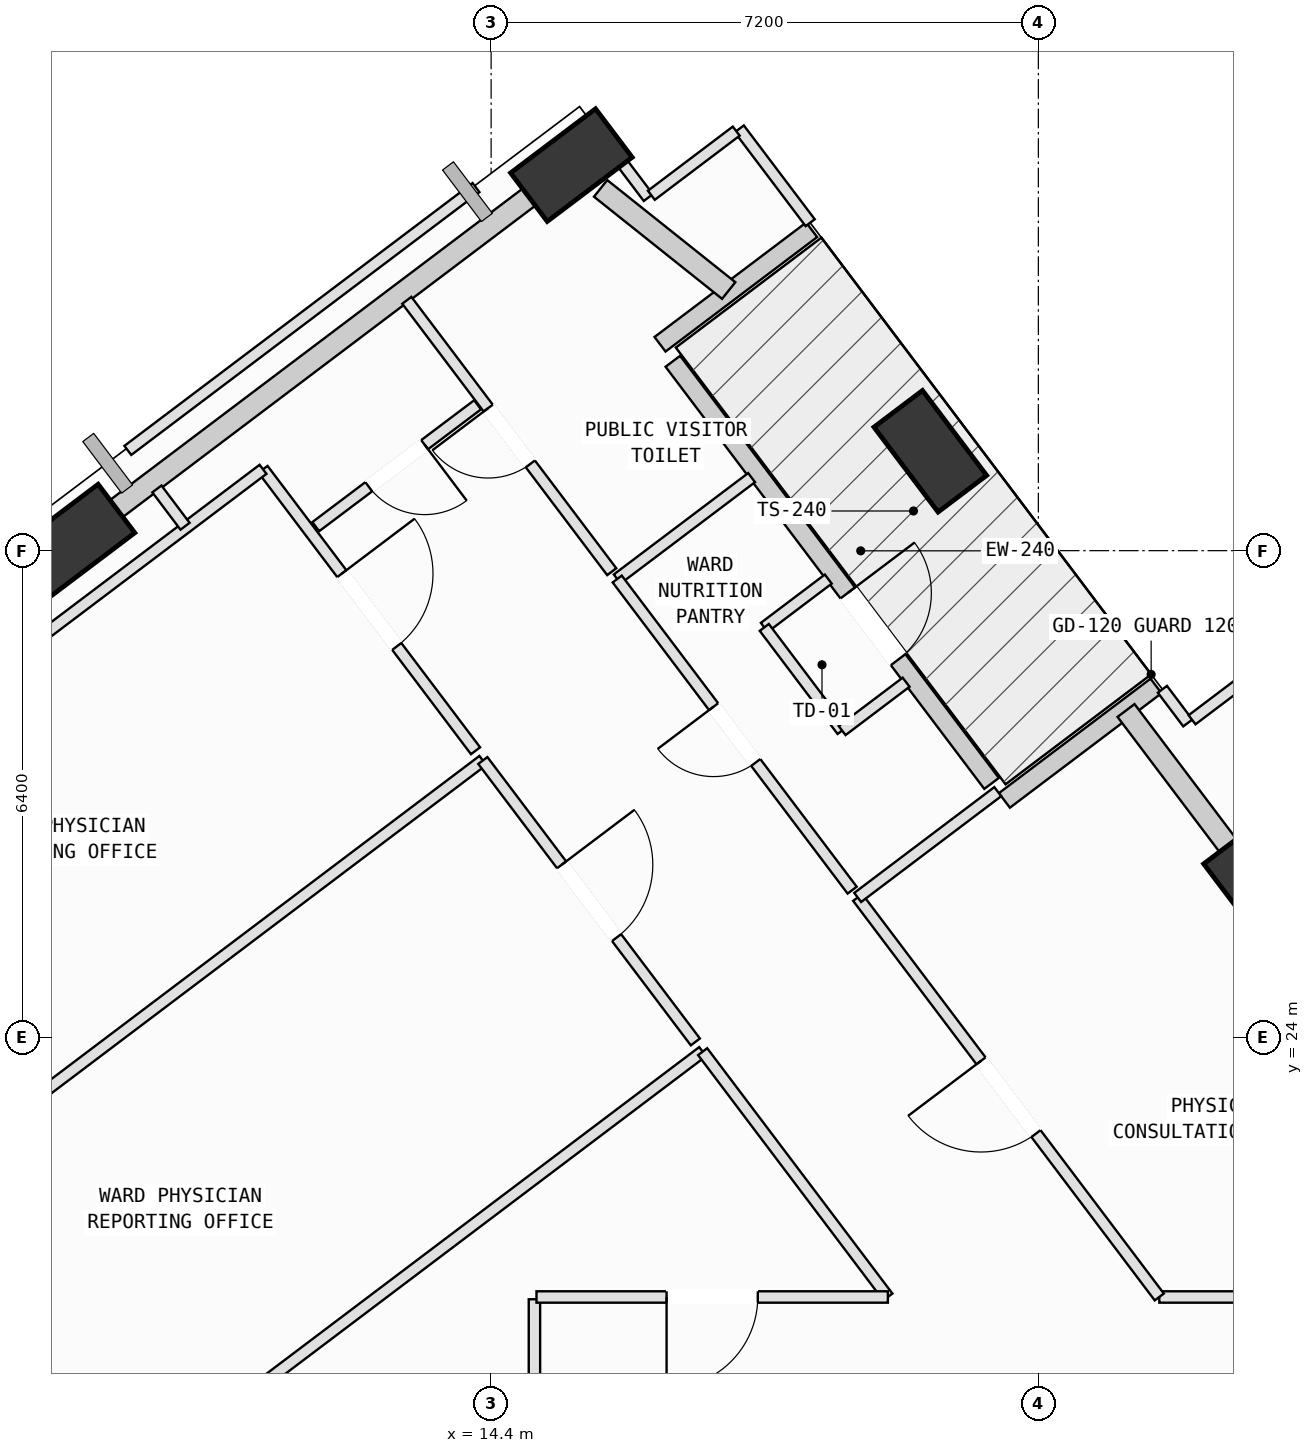
"""IFC4 building model, lengths in metres.
Left out: names, types, materials, properties, quantities, classifications, styles, units other than length and angle.
Written with IfcOpenShell. Run it as: python <this file> out.ifc"""

import sys

from ifc_helpers import new_model, si_unit, direction, frame, frame_2d, origin, origin_2d, place, context, subcontext, project, spatial, rectangle, extrude, element, fill, save


model = new_model("IFC4")
c1 = context("Model", 3, precision=1e-05, world=origin(), true_north=direction((0.0, 1.0)))
c2 = subcontext(c1, "Body", "Model", "MODEL_VIEW")
j1 = project(units=[si_unit("LENGTHUNIT", "METRE"), si_unit("PLANEANGLEUNIT", "RADIAN")], contexts=[c1])
p1 = place(None, origin())
s1 = spatial("IfcSite", under=j1, at=p1, CompositionType="ELEMENT")
p2 = place(p1, origin())
s2 = spatial("IfcBuilding", under=s1, at=p2, CompositionType="ELEMENT")
p3 = place(p2, frame((0.0, 0.0, 181.8)))
s3 = spatial("IfcBuildingStorey", under=s2, at=p3, CompositionType="ELEMENT", Elevation=181.8)
p4 = place(p3, frame((24.516, 25.961, 0.002), z_axis=(-0.004517486263, -0.037666067894, 0.999280170747), x_axis=(-0.503252595216, 0.863608778527, 0.030277104545)))
e1 = element("IfcColumn", 1, at=p4, inside=s3, PredefinedType="COLUMN", context=c2, shape_type="SweptSolid", body=[
    extrude(rectangle(XDim=1.4, YDim=0.8, at=origin_2d()), origin(), (0.0, 0.0, 1.0), 3.999),
])
p5 = place(p3, frame((20.178, 31.708, 0.002), z_axis=(-0.028107984408, -0.055789166449, 0.998046847658), x_axis=(-0.179673360041, 0.982462048739, 0.049857862766)))
e2 = element("IfcColumn", 2, at=p5, inside=s3, PredefinedType="COLUMN", context=c2, shape_type="SweptSolid", body=[
    extrude(rectangle(XDim=1.4, YDim=0.8, at=origin_2d()), origin(), (0.0, 0.0, 1.0), 4.004),
])
p6 = place(p3, frame((15.456, 35.473, 0.002), z_axis=(-0.043453933632, -0.075283635719, 0.996214901437), x_axis=(0.991285786254, 0.120869992287, 0.05237303634)))
e3 = element("IfcColumn", 3, at=p6, inside=s3, PredefinedType="COLUMN", context=c2, shape_type="SweptSolid", body=[
    extrude(rectangle(XDim=1.4, YDim=0.8, at=origin_2d()), origin(), (0.0, 0.0, 1.0), 4.011),
])
p7 = place(p3, frame((8.912, 30.532, 0.002), z_axis=(-0.022783812004, -0.101949964112, 0.994528583163), x_axis=(0.909585631227, 0.41072177351, 0.06294127605)))
e4 = element("IfcColumn", 4, at=p7, inside=s3, PredefinedType="COLUMN", context=c2, shape_type="SweptSolid", body=[
    extrude(rectangle(XDim=1.4, YDim=0.8, at=origin_2d()), origin(), (0.0, 0.0, 1.0), 4.018),
])
p8 = place(p3, frame((16.791, 32.892, 0.0), z_axis=(0.0, 0.0, 1.0), x_axis=(0.602494608464, -0.798122952165, 0.0)))
e5 = element("IfcWall", 5, at=p8, inside=s3, PredefinedType="SOLIDWALL", context=c2, shape_type="SweptSolid", body=[
    extrude(rectangle(XDim=6.96, YDim=0.24, at=frame_2d((3.48, 0.0))), origin(), (0.0, 0.0, 1.0), 3.265),
])
p9 = place(p8, frame((3.82, 0.0, 0.0)))
e6 = element("IfcOpeningElement", 6, at=p9, cuts=e5, PredefinedType="OPENING", context=c2, shape_type="SweptSolid", body=[
    extrude(rectangle(XDim=1.1, YDim=2.15, at=frame_2d((0.55, 1.075))), frame((0.0, 0.13, 0.0), z_axis=(0.0, -1.0, 0.0), x_axis=(1.0, 0.0, 0.0)), (0.0, 0.0, 1.0), 0.26),
])
for number, where, z_axis, x_axis in (
    (7, (21.153, 27.114, 0.0), (0.0, 0.0, 1.0), (0.798, 0.603, 0.0)),
    (8, (18.617, 34.622, 0.0), (0.0, 0.0, 1.0), (-0.798, -0.603, 0.0)),
):
    element("IfcWall", number, at=place(p3, frame(where, z_axis=z_axis, x_axis=x_axis)), inside=s3, PredefinedType="SOLIDWALL", context=c2, shape_type="SweptSolid", body=[
        extrude(rectangle(XDim=2.5, YDim=0.24, at=frame_2d((1.25, 0.0))), origin(), (0.0, 0.0, 1.0), 3.265),
    ])
p10 = place(p3, frame((24.252, 26.312, 0.0), z_axis=(0.0, 0.0, 1.0), x_axis=(-0.602494218239, 0.798123246741, 0.0)))
e9 = element("IfcWall", 9, at=p10, inside=s3, PredefinedType="SOLIDWALL", context=c2, shape_type="SweptSolid", body=[
    extrude(rectangle(XDim=2.487, YDim=0.28, at=frame_2d((1.244, 0.0))), origin(), (0.0, 0.0, 1.0), 3.245),
])
p11 = place(p3, frame((15.841, 35.167, 0.0), z_axis=(0.0, 0.0, 1.0), x_axis=(0.781829208008, -0.623492653931, 0.0)))
e10 = element("IfcWall", 10, at=p11, inside=s3, PredefinedType="SOLIDWALL", context=c2, shape_type="SweptSolid", body=[
    extrude(rectangle(XDim=2.156, YDim=0.28, at=frame_2d((1.078, 0.0))), origin(), (0.0, 0.0, 1.0), 3.245),
])
p12 = place(p3, frame((9.165, 30.723, 0.0), z_axis=(0.0, 0.0, 1.0), x_axis=(0.798107969136, 0.602514455928, 0.0)))
e11 = element("IfcWall", 11, at=p12, inside=s3, PredefinedType="SOLIDWALL", context=c2, shape_type="SweptSolid", body=[
    extrude(rectangle(XDim=7.231, YDim=0.28, at=frame_2d((3.615, 0.0))), origin(), (0.0, 0.0, 1.0), 3.265),
])
p13 = place(p3, frame((14.97, 20.55, 0.0), z_axis=(0.0, 0.0, 1.0), x_axis=(0.0, -1.0, 0.0)))
e12 = element("IfcWall", 12, at=p13, inside=s3, PredefinedType="PARTITIONING", context=c2, shape_type="SweptSolid", body=[
    extrude(rectangle(XDim=2.32, YDim=0.15, at=frame_2d((1.16, 0.0))), origin(), (0.0, 0.0, 1.0), 3.78),
])
p14 = place(p3, frame((6.301, 15.593, 0.0), z_axis=(0.0, 0.0, 1.0), x_axis=(0.798111656514, 0.60250957149, 0.0)))
e13 = element("IfcWall", 13, at=p14, inside=s3, PredefinedType="PARTITIONING", context=c2, shape_type="SweptSolid", body=[
    extrude(rectangle(XDim=13.635, YDim=0.15, at=frame_2d((6.817, 0.0))), origin(), (0.0, 0.0, 1.0), 3.78),
])
p15 = place(p3, frame((17.183, 23.808, 0.0), z_axis=(0.0, 0.0, 1.0), x_axis=(0.602527348014, -0.798098236369, 0.0)))
e14 = element("IfcWall", 14, at=p15, inside=s3, PredefinedType="PARTITIONING", context=c2, shape_type="SweptSolid", body=[
    extrude(rectangle(XDim=4.045, YDim=0.15, at=frame_2d((2.022, 0.0))), origin(), (0.0, 0.0, 1.0), 3.78),
])
p16 = place(p3, frame((19.62, 20.58, 0.0), z_axis=(0.0, 0.0, 1.0), x_axis=(-1.0, 0.0, 0.0)))
e15 = element("IfcWall", 15, at=p16, inside=s3, PredefinedType="PARTITIONING", context=c2, shape_type="SweptSolid", body=[
    extrude(rectangle(XDim=4.623, YDim=0.15, at=frame_2d((2.312, 0.0))), origin(), (0.0, 0.0, 1.0), 3.78),
])
p17 = place(p16, frame((1.711, 0.0, 0.0)))
e16 = element("IfcOpeningElement", 16, at=p17, cuts=e15, PredefinedType="OPENING", context=c2, shape_type="SweptSolid", body=[
    extrude(rectangle(XDim=1.2, YDim=2.15, at=frame_2d((0.6, 1.075))), frame((0.0, 0.085, 0.0), z_axis=(0.0, -1.0, 0.0), x_axis=(1.0, 0.0, 0.0)), (0.0, 0.0, 1.0), 0.17),
])
p18 = place(p3, frame((3.409, 19.424, 0.0), z_axis=(0.0, 0.0, 1.0), x_axis=(0.798120266847, 0.60249816568, 0.0)))
e17 = element("IfcWall", 17, at=p18, inside=s3, PredefinedType="PARTITIONING", context=c2, shape_type="SweptSolid", body=[
    extrude(rectangle(XDim=13.635, YDim=0.15, at=frame_2d((6.817, 0.0))), origin(), (0.0, 0.0, 1.0), 3.78),
])
p19 = place(p3, frame((14.291, 27.639, 0.0), z_axis=(0.0, 0.0, 1.0), x_axis=(0.602581465391, -0.798057377365, 0.0)))
e18 = element("IfcWall", 18, at=p19, inside=s3, PredefinedType="PARTITIONING", context=c2, shape_type="SweptSolid", body=[
    extrude(rectangle(XDim=4.64, YDim=0.15, at=frame_2d((2.32, 0.0))), origin(), (0.0, 0.0, 1.0), 3.78),
])
p20 = place(p19, frame((1.72, 0.0, 0.0)))
e19 = element("IfcOpeningElement", 19, at=p20, cuts=e18, PredefinedType="OPENING", context=c2, shape_type="SweptSolid", body=[
    extrude(rectangle(XDim=1.2, YDim=2.15, at=frame_2d((0.6, 1.075))), frame((0.0, 0.085, 0.0), z_axis=(0.0, -1.0, 0.0), x_axis=(1.0, 0.0, 0.0)), (0.0, 0.0, 1.0), 0.17),
])
p21 = place(p3, frame((11.399, 31.47, 0.0), z_axis=(0.0, 0.0, 1.0), x_axis=(0.602614975976, -0.798032073747, 0.0)))
e20 = element("IfcWall", 20, at=p21, inside=s3, PredefinedType="PARTITIONING", context=c2, shape_type="SweptSolid", body=[
    extrude(rectangle(XDim=4.64, YDim=0.15, at=frame_2d((2.32, 0.0))), origin(), (0.0, 0.0, 1.0), 3.78),
])
p22 = place(p21, frame((1.72, 0.0, 0.0)))
e21 = element("IfcOpeningElement", 21, at=p22, cuts=e20, PredefinedType="OPENING", context=c2, shape_type="SweptSolid", body=[
    extrude(rectangle(XDim=1.2, YDim=2.15, at=frame_2d((0.6, 1.075))), frame((0.0, 0.085, 0.0), z_axis=(0.0, -1.0, 0.0), x_axis=(1.0, 0.0, 0.0)), (0.0, 0.0, 1.0), 0.17),
])
p23 = place(p3, frame((2.509, 24.759, 0.0), z_axis=(0.0, 0.0, 1.0), x_axis=(0.798120739774, 0.6024975392, 0.0)))
e22 = element("IfcWall", 22, at=p23, inside=s3, PredefinedType="PARTITIONING", context=c2, shape_type="SweptSolid", body=[
    extrude(rectangle(XDim=11.138, YDim=0.15, at=frame_2d((5.569, 0.0))), origin(), (0.0, 0.0, 1.0), 3.265),
])
p24 = place(p3, frame((24.264, 20.58, 0.0), z_axis=(0.0, 0.0, 1.0), x_axis=(-1.0, 0.0, 0.0)))
e23 = element("IfcWall", 23, at=p24, inside=s3, PredefinedType="PARTITIONING", context=c2, shape_type="SweptSolid", body=[
    extrude(rectangle(XDim=1.073, YDim=0.15, at=frame_2d((0.537, 0.0))), origin(), (0.0, 0.0, 1.0), 3.78),
])
p25 = place(p3, frame((23.191, 20.58, 0.0), z_axis=(0.0, 0.0, 1.0), x_axis=(-0.602464385219, 0.798145766476, 0.0)))
e24 = element("IfcWall", 24, at=p25, inside=s3, PredefinedType="PARTITIONING", context=c2, shape_type="SweptSolid", body=[
    extrude(rectangle(XDim=6.586, YDim=0.15, at=frame_2d((3.293, 0.0))), origin(), (0.0, 0.0, 1.0), 3.78),
])
p26 = place(p25, frame((2.693, 0.0, 0.0)))
e25 = element("IfcOpeningElement", 25, at=p26, cuts=e24, PredefinedType="OPENING", context=c2, shape_type="SweptSolid", body=[
    extrude(rectangle(XDim=1.2, YDim=2.15, at=frame_2d((0.6, 1.075))), frame((0.0, 0.085, 0.0), z_axis=(0.0, -1.0, 0.0), x_axis=(1.0, 0.0, 0.0)), (0.0, 0.0, 1.0), 0.17),
])
p27 = place(p3, frame((19.223, 25.837, 0.0), z_axis=(0.0, 0.0, 1.0), x_axis=(0.797953180957, 0.602719438047, 0.0)))
e26 = element("IfcWall", 26, at=p27, inside=s3, PredefinedType="PARTITIONING", context=c2, shape_type="SweptSolid", body=[
    extrude(rectangle(XDim=2.31, YDim=0.15, at=frame_2d((1.155, 0.0))), origin(), (0.0, 0.0, 1.0), 3.78),
])
p28 = place(p3, frame((23.232, 28.576, 0.0), z_axis=(0.0, 0.0, 1.0), x_axis=(0.602110576482, -0.798412708872, 0.0)))
e27 = element("IfcWall", 27, at=p28, inside=s3, PredefinedType="PARTITIONING", context=c2, shape_type="SweptSolid", body=[
    extrude(rectangle(XDim=0.555, YDim=0.15, at=frame_2d((0.277, 0.0))), origin(), (0.0, 0.0, 1.0), 3.78),
])
p29 = place(p3, frame((16.059, 30.027, 0.0), z_axis=(0.0, 0.0, 1.0), x_axis=(0.798237153688, 0.602343296196, 0.0)))
e28 = element("IfcWall", 28, at=p29, inside=s3, PredefinedType="PARTITIONING", context=c2, shape_type="SweptSolid", body=[
    extrude(rectangle(XDim=2.215, YDim=0.15, at=frame_2d((1.107, 0.0))), origin(), (0.0, 0.0, 1.0), 3.78),
])
p30 = place(p3, frame((18.836, 30.026, 0.0), z_axis=(0.0, 0.0, 1.0), x_axis=(-0.797968701854, -0.602698889049, 0.0)))
e29 = element("IfcWall", 29, at=p30, inside=s3, PredefinedType="PARTITIONING", context=c2, shape_type="SweptSolid", body=[
    extrude(rectangle(XDim=1.055, YDim=0.15, at=frame_2d((0.528, 0.0))), origin(), (0.0, 0.0, 1.0), 3.78),
])
p31 = place(p3, frame((17.994, 29.39, 0.0), z_axis=(0.0, 0.0, 1.0), x_axis=(0.602432799865, -0.798169607068, 0.0)))
e30 = element("IfcWall", 30, at=p31, inside=s3, PredefinedType="PARTITIONING", context=c2, shape_type="SweptSolid", body=[
    extrude(rectangle(XDim=1.7, YDim=0.15, at=frame_2d((0.85, 0.0))), origin(), (0.0, 0.0, 1.0), 3.78),
])
p32 = place(p3, frame((19.018, 28.033, 0.0), z_axis=(0.0, 0.0, 1.0), x_axis=(0.797968701854, 0.602698889049, 0.0)))
e31 = element("IfcWall", 31, at=p32, inside=s3, PredefinedType="PARTITIONING", context=c2, shape_type="SweptSolid", body=[
    extrude(rectangle(XDim=1.055, YDim=0.15, at=frame_2d((0.528, 0.0))), origin(), (0.0, 0.0, 1.0), 3.78),
])
p33 = place(p3, frame((19.15, 25.933, 0.0), z_axis=(0.0, 0.0, 1.0), x_axis=(-0.602532763548, 0.798094147862, 0.0)))
e32 = element("IfcWall", 32, at=p33, inside=s3, PredefinedType="PARTITIONING", context=c2, shape_type="SweptSolid", body=[
    extrude(rectangle(XDim=5.13, YDim=0.15, at=frame_2d((2.565, 0.0))), origin(), (0.0, 0.0, 1.0), 3.78),
])
p34 = place(p33, frame((2.105, 0.0, 0.0)))
e33 = element("IfcOpeningElement", 33, at=p34, cuts=e32, PredefinedType="OPENING", context=c2, shape_type="SweptSolid", body=[
    extrude(rectangle(XDim=0.92, YDim=2.1, at=frame_2d((0.46, 1.05))), frame((0.0, 0.085, 0.0), z_axis=(0.0, -1.0, 0.0), x_axis=(1.0, 0.0, 0.0)), (0.0, 0.0, 1.0), 0.17),
])
p35 = place(p3, frame((17.665, 35.95, 0.0), z_axis=(0.0, 0.0, 1.0), x_axis=(0.602772833001, -0.797912847244, 0.0)))
e34 = element("IfcWall", 34, at=p35, inside=s3, PredefinedType="PARTITIONING", context=c2, shape_type="SweptSolid", body=[
    extrude(rectangle(XDim=1.548, YDim=0.15, at=frame_2d((0.774, 0.0))), origin(), (0.0, 0.0, 1.0), 3.78),
])
p36 = place(p3, frame((15.987, 30.123, 0.0), z_axis=(0.0, 0.0, 1.0), x_axis=(-0.602537420483, 0.79809063202, 0.0)))
e35 = element("IfcWall", 35, at=p36, inside=s3, PredefinedType="PARTITIONING", context=c2, shape_type="SweptSolid", body=[
    extrude(rectangle(XDim=4.474, YDim=0.15, at=frame_2d((2.237, 0.0))), origin(), (0.0, 0.0, 1.0), 3.78),
])
p37 = place(p36, frame((1.777, 0.0, 0.0)))
e36 = element("IfcOpeningElement", 36, at=p37, cuts=e35, PredefinedType="OPENING", context=c2, shape_type="SweptSolid", body=[
    extrude(rectangle(XDim=0.92, YDim=2.1, at=frame_2d((0.46, 1.05))), frame((0.0, 0.085, 0.0), z_axis=(0.0, -1.0, 0.0), x_axis=(1.0, 0.0, 0.0)), (0.0, 0.0, 1.0), 0.17),
])
p38 = place(p3, frame((14.821, 35.232, 0.0), z_axis=(0.0, 0.0, 1.0), x_axis=(0.798340170891, 0.602206751491, 0.0)))
e37 = element("IfcWall", 37, at=p38, inside=s3, PredefinedType="PARTITIONING", context=c2, shape_type="SweptSolid", body=[
    extrude(rectangle(XDim=1.202, YDim=0.15, at=frame_2d((0.601, 0.0))), origin(), (0.0, 0.0, 1.0), 3.265),
])
p39 = place(p3, frame((15.811, 35.916, 0.0), z_axis=(0.0, 0.0, 1.0), x_axis=(0.60257647238, -0.798061147366, 0.0)))
e38 = element("IfcWall", 38, at=p39, inside=s3, PredefinedType="PARTITIONING", context=c2, shape_type="SweptSolid", body=[
    extrude(rectangle(XDim=1.09, YDim=0.15, at=frame_2d((0.545, 0.0))), origin(), (0.0, 0.0, 1.0), 3.78),
])
p40 = place(p3, frame((16.508, 35.076, 0.0), z_axis=(0.0, 0.0, 1.0), x_axis=(0.79783936347, 0.602870093883, 0.0)))
e39 = element("IfcWall", 39, at=p40, inside=s3, PredefinedType="PARTITIONING", context=c2, shape_type="SweptSolid", body=[
    extrude(rectangle(XDim=1.4, YDim=0.15, at=frame_2d((0.7, 0.0))), origin(), (0.0, 0.0, 1.0), 3.78),
])
p41 = place(p3, frame((10.373, 30.721, 0.0), z_axis=(0.0, 0.0, 1.0), x_axis=(-0.60196768023, 0.79852045181, 0.0)))
e40 = element("IfcWall", 40, at=p41, inside=s3, PredefinedType="PARTITIONING", context=c2, shape_type="SweptSolid", body=[
    extrude(rectangle(XDim=0.615, YDim=0.15, at=frame_2d((0.307, 0.0))), origin(), (0.0, 0.0, 1.0), 3.78),
])
p42 = place(p3, frame((9.62, 31.719, 0.0), z_axis=(0.0, 0.0, 1.0), x_axis=(0.798122768772, 0.602494851404, 0.0)))
e41 = element("IfcWall", 41, at=p42, inside=s3, PredefinedType="PARTITIONING", context=c2, shape_type="SweptSolid", body=[
    extrude(rectangle(XDim=5.74, YDim=0.15, at=frame_2d((2.87, 0.0))), origin(), (0.0, 0.0, 1.0), 3.78),
])
p43 = place(p3, frame((14.222, 32.319, 0.0), z_axis=(0.0, 0.0, 1.0), x_axis=(-0.798855231842, -0.601523331683, 0.0)))
e42 = element("IfcWall", 42, at=p43, inside=s3, PredefinedType="PARTITIONING", context=c2, shape_type="SweptSolid", body=[
    extrude(rectangle(XDim=2.665, YDim=0.15, at=frame_2d((1.333, 0.0))), origin(), (0.0, 0.0, 1.0), 3.78),
])
p44 = place(p43, frame((0.873, 0.0, 0.0)))
e43 = element("IfcOpeningElement", 43, at=p44, cuts=e42, PredefinedType="OPENING", context=c2, shape_type="SweptSolid", body=[
    extrude(rectangle(XDim=0.92, YDim=2.1, at=frame_2d((0.46, 1.05))), frame((0.0, 0.085, 0.0), z_axis=(0.0, -1.0, 0.0), x_axis=(1.0, 0.0, 0.0)), (0.0, 0.0, 1.0), 0.17),
])
p45 = place(p3, frame((23.622, 28.175, 0.0), z_axis=(0.0, 0.0, 1.0), x_axis=(0.797973879447, 0.602692033895, 0.0)))
e44 = element("IfcWall", 44, at=p45, inside=s3, PredefinedType="PARTITIONING", context=c2, shape_type="SweptSolid", body=[
    extrude(rectangle(XDim=2.13, YDim=0.15, at=frame_2d((1.065, 0.0))), origin(), (0.0, 0.0, 1.0), 3.78),
])
p46 = place(p9, origin())
e45 = element("IfcDoor", 45, at=p46, inside=s3, OperationType="SINGLE_SWING_LEFT", PredefinedType="DOOR", context=c2, shape_type="SweptSolid", body=[
    extrude(rectangle(XDim=1.1, YDim=2.15, at=frame_2d((0.55, 1.075))), frame((0.0, 0.025, 0.0), z_axis=(0.0, -1.0, 0.0), x_axis=(1.0, 0.0, 0.0)), (0.0, 0.0, 1.0), 0.05),
])
fill(e6, e45)
p47 = place(p17, origin())
e46 = element("IfcDoor", 46, at=p47, inside=s3, OperationType="SINGLE_SWING_RIGHT", PredefinedType="DOOR", context=c2, shape_type="SweptSolid", body=[
    extrude(rectangle(XDim=1.2, YDim=2.15, at=frame_2d((0.6, 1.075))), frame((0.0, 0.025, 0.0), z_axis=(0.0, -1.0, 0.0), x_axis=(1.0, 0.0, 0.0)), (0.0, 0.0, 1.0), 0.05),
])
fill(e16, e46)
p48 = place(p20, origin())
e47 = element("IfcDoor", 47, at=p48, inside=s3, OperationType="SINGLE_SWING_LEFT", PredefinedType="DOOR", context=c2, shape_type="SweptSolid", body=[
    extrude(rectangle(XDim=1.2, YDim=2.15, at=frame_2d((0.6, 1.075))), frame((0.0, 0.025, 0.0), z_axis=(0.0, -1.0, 0.0), x_axis=(1.0, 0.0, 0.0)), (0.0, 0.0, 1.0), 0.05),
])
fill(e19, e47)
p49 = place(p22, origin())
e48 = element("IfcDoor", 48, at=p49, inside=s3, OperationType="SINGLE_SWING_LEFT", PredefinedType="DOOR", context=c2, shape_type="SweptSolid", body=[
    extrude(rectangle(XDim=1.2, YDim=2.15, at=frame_2d((0.6, 1.075))), frame((0.0, 0.025, 0.0), z_axis=(0.0, -1.0, 0.0), x_axis=(1.0, 0.0, 0.0)), (0.0, 0.0, 1.0), 0.05),
])
fill(e21, e48)
p50 = place(p26, origin())
e49 = element("IfcDoor", 49, at=p50, inside=s3, OperationType="SINGLE_SWING_RIGHT", PredefinedType="DOOR", context=c2, shape_type="SweptSolid", body=[
    extrude(rectangle(XDim=1.2, YDim=2.15, at=frame_2d((0.6, 1.075))), frame((0.0, 0.025, 0.0), z_axis=(0.0, -1.0, 0.0), x_axis=(1.0, 0.0, 0.0)), (0.0, 0.0, 1.0), 0.05),
])
fill(e25, e49)
p51 = place(p34, origin())
e50 = element("IfcDoor", 50, at=p51, inside=s3, OperationType="SINGLE_SWING_RIGHT", PredefinedType="DOOR", context=c2, shape_type="SweptSolid", body=[
    extrude(rectangle(XDim=0.92, YDim=2.1, at=frame_2d((0.46, 1.05))), frame((0.0, 0.025, 0.0), z_axis=(0.0, -1.0, 0.0), x_axis=(1.0, 0.0, 0.0)), (0.0, 0.0, 1.0), 0.05),
])
fill(e33, e50)
p52 = place(p37, origin())
e51 = element("IfcDoor", 51, at=p52, inside=s3, OperationType="SINGLE_SWING_RIGHT", PredefinedType="DOOR", context=c2, shape_type="SweptSolid", body=[
    extrude(rectangle(XDim=0.92, YDim=2.1, at=frame_2d((0.46, 1.05))), frame((0.0, 0.025, 0.0), z_axis=(0.0, -1.0, 0.0), x_axis=(1.0, 0.0, 0.0)), (0.0, 0.0, 1.0), 0.05),
])
fill(e36, e51)
p53 = place(p44, origin())
e52 = element("IfcDoor", 52, at=p53, inside=s3, OperationType="SINGLE_SWING_LEFT", PredefinedType="DOOR", context=c2, shape_type="SweptSolid", body=[
    extrude(rectangle(XDim=0.92, YDim=2.1, at=frame_2d((0.46, 1.05))), frame((0.0, 0.025, 0.0), z_axis=(0.0, -1.0, 0.0), x_axis=(1.0, 0.0, 0.0)), (0.0, 0.0, 1.0), 0.05),
])
fill(e43, e52)
save(model, sys.argv[1])
